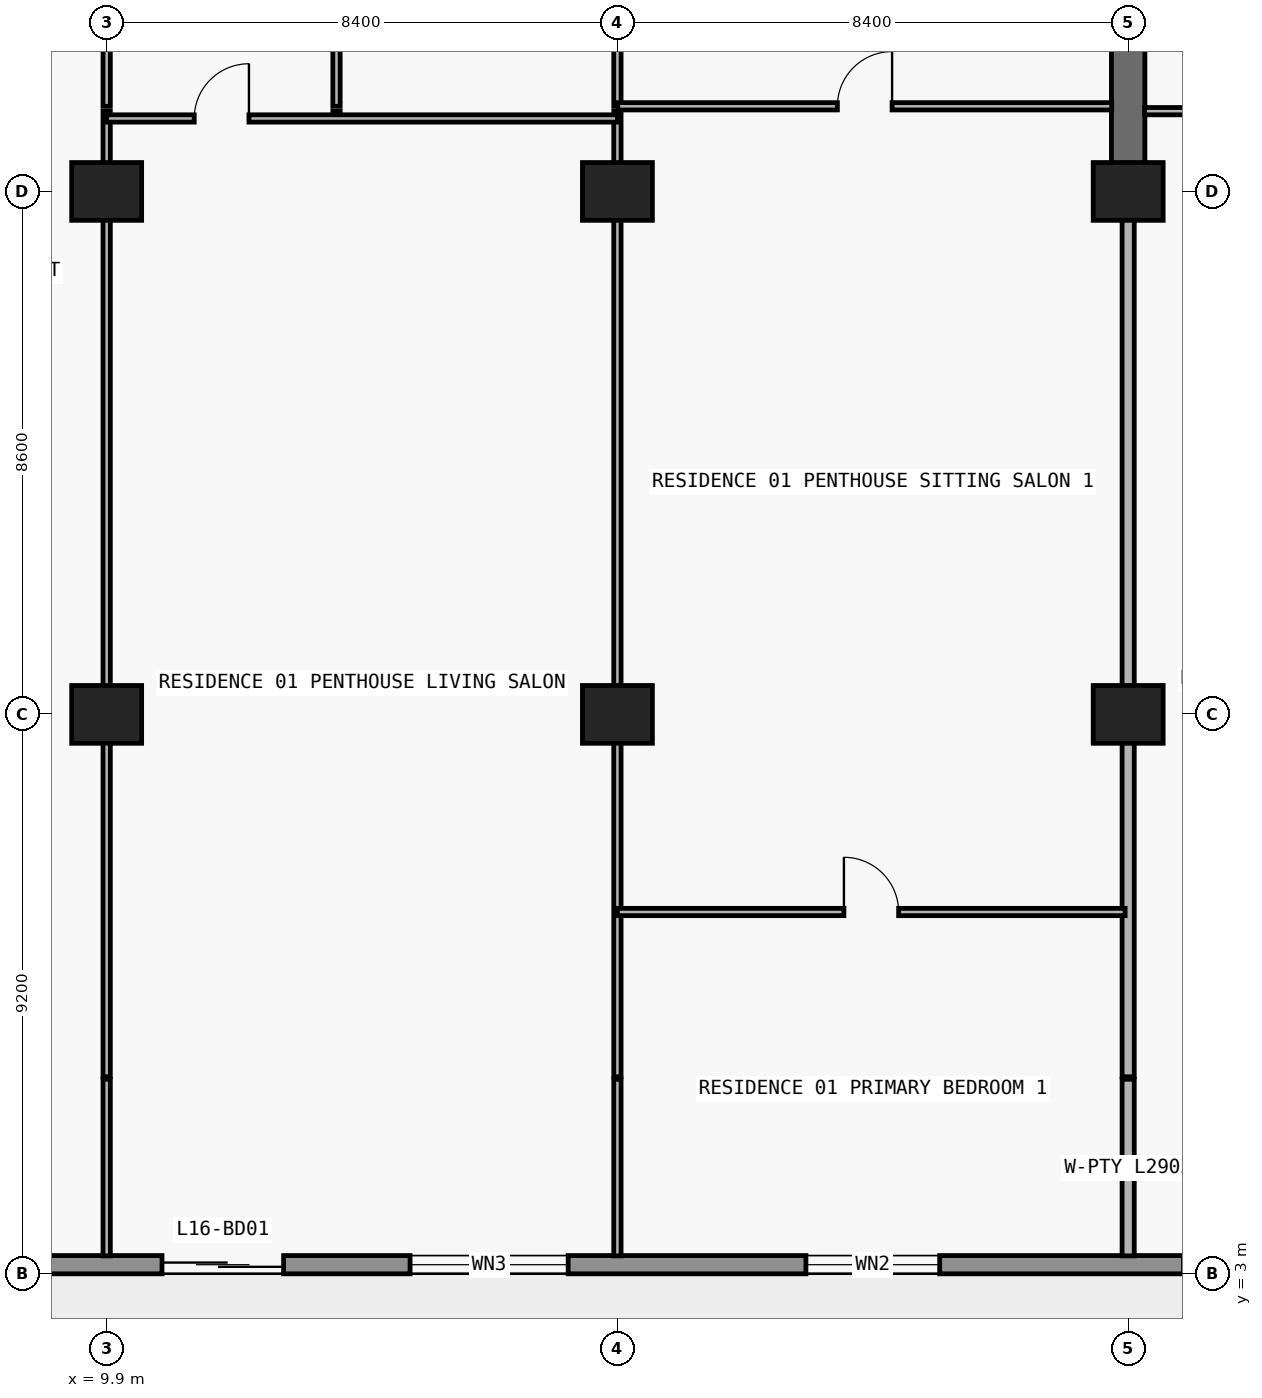
"""IFC4 building model, lengths in metres.
Left out: names, types, materials, properties, quantities, classifications, styles, units other than length and angle.
Written with IfcOpenShell. Run it as: python <this file> out.ifc"""

import sys

from ifc_helpers import new_model, si_unit, direction, frame, frame_2d, origin, origin_2d, place, context, subcontext, project, spatial, rectangle, extrude, element, fill, save


model = new_model("IFC4")
c1 = context("Model", 3, precision=1e-05, world=origin(), true_north=direction((0.0, 1.0)))
c2 = subcontext(c1, "Body", "Model", "MODEL_VIEW")
j1 = project(units=[si_unit("LENGTHUNIT", "METRE"), si_unit("PLANEANGLEUNIT", "RADIAN")], contexts=[c1])
p1 = place(None, origin())
s1 = spatial("IfcSite", under=j1, at=p1, CompositionType="ELEMENT")
p2 = place(p1, origin())
s2 = spatial("IfcBuilding", under=s1, at=p2, CompositionType="ELEMENT")
p3 = place(p2, frame((0.0, 0.0, 63.0)))
s3 = spatial("IfcBuildingStorey", under=s2, at=p3, CompositionType="ELEMENT", Elevation=63.0)
for number, where, z_axis, x_axis in (
    (1, (9.9, 12.2, 0.0), (0.0, 0.0, 1.0), (1.0, 0.0, 0.0)),
    (2, (18.3, 12.2, 0.0), (0.0, 0.0, 1.0), (1.0, 0.0, 0.0)),
    (3, (26.7, 12.2, 0.0), (0.0, 0.0, 1.0), (1.0, 0.0, 0.0)),
    (4, (9.9, 20.8, 0.0), (0.0, 0.0, 1.0), (1.0, 0.0, 0.0)),
    (5, (18.3, 20.8, 0.0), (0.0, 0.0, 1.0), (1.0, 0.0, 0.0)),
    (6, (26.7, 20.8, 0.0), (0.0, 0.0, 1.0), (1.0, 0.0, 0.0)),
):
    element("IfcColumn", number, at=place(p3, frame(where, z_axis=z_axis, x_axis=x_axis)), inside=s3, PredefinedType="COLUMN", context=c2, shape_type="SweptSolid", body=[
        extrude(rectangle(XDim=1.15, YDim=0.95, at=origin_2d()), origin(), (0.0, 0.0, 1.0), 3.05),
    ])
p4 = place(p3, frame((26.7, 20.8, 0.0), z_axis=(0.0, 0.0, 1.0), x_axis=(0.0, 1.0, 0.0)))
e7 = element("IfcWall", 7, at=p4, inside=s3, PredefinedType="SHEAR", context=c2, shape_type="SweptSolid", body=[
    extrude(rectangle(XDim=8.6, YDim=0.55, at=frame_2d((4.3, 0.0))), origin(), (0.0, 0.0, 1.0), 3.05),
])
p5 = place(p3, frame((72.7, 3.15, 0.0), z_axis=(0.0, 0.0, 1.0), x_axis=(-1.0, 0.0, 0.0)))
e8 = element("IfcWall", 8, at=p5, inside=s3, PredefinedType="STANDARD", context=c2, shape_type="SweptSolid", body=[
    extrude(rectangle(XDim=67.6, YDim=0.3, at=frame_2d((33.8, 0.0))), origin(), (0.0, 0.0, 1.0), 3.05),
])
p6 = place(p5, frame((59.89, 0.0, 0.0)))
e9 = element("IfcOpeningElement", 9, at=p6, cuts=e8, PredefinedType="OPENING", context=c2, shape_type="SweptSolid", body=[
    extrude(rectangle(XDim=2.0, YDim=2.3, at=frame_2d((1.0, 1.15))), frame((0.0, 0.16, 0.0), z_axis=(0.0, -1.0, 0.0), x_axis=(1.0, 0.0, 0.0)), (0.0, 0.0, 1.0), 0.32),
])
p7 = place(p5, frame((55.21, 0.0, 0.65)))
e10 = element("IfcOpeningElement", 10, at=p7, cuts=e8, PredefinedType="OPENING", context=c2, shape_type="SweptSolid", body=[
    extrude(rectangle(XDim=2.6, YDim=1.85, at=frame_2d((1.3, 0.925))), frame((0.0, 0.16, 0.0), z_axis=(0.0, -1.0, 0.0), x_axis=(1.0, 0.0, 0.0)), (0.0, 0.0, 1.0), 0.32),
])
p8 = place(p5, frame((49.1, 0.0, 0.85)))
e11 = element("IfcOpeningElement", 11, at=p8, cuts=e8, PredefinedType="OPENING", context=c2, shape_type="SweptSolid", body=[
    extrude(rectangle(XDim=2.2, YDim=1.55, at=frame_2d((1.1, 0.775))), frame((0.0, 0.16, 0.0), z_axis=(0.0, -1.0, 0.0), x_axis=(1.0, 0.0, 0.0)), (0.0, 0.0, 1.0), 0.32),
])
p9 = place(p5, frame((43.09, 0.0, 0.0)))
e12 = element("IfcOpeningElement", 12, at=p9, cuts=e8, PredefinedType="OPENING", context=c2, shape_type="SweptSolid", body=[
    extrude(rectangle(XDim=2.0, YDim=2.3, at=frame_2d((1.0, 1.15))), frame((0.0, 0.16, 0.0), z_axis=(0.0, -1.0, 0.0), x_axis=(1.0, 0.0, 0.0)), (0.0, 0.0, 1.0), 0.32),
])
p10 = place(p5, frame((38.41, 0.0, 0.65)))
e13 = element("IfcOpeningElement", 13, at=p10, cuts=e8, PredefinedType="OPENING", context=c2, shape_type="SweptSolid", body=[
    extrude(rectangle(XDim=2.6, YDim=1.85, at=frame_2d((1.3, 0.925))), frame((0.0, 0.16, 0.0), z_axis=(0.0, -1.0, 0.0), x_axis=(1.0, 0.0, 0.0)), (0.0, 0.0, 1.0), 0.32),
])
p11 = place(p5, frame((32.7, 0.0, 0.85)))
e14 = element("IfcOpeningElement", 14, at=p11, cuts=e8, PredefinedType="OPENING", context=c2, shape_type="SweptSolid", body=[
    extrude(rectangle(XDim=2.2, YDim=1.55, at=frame_2d((1.1, 0.775))), frame((0.0, 0.16, 0.0), z_axis=(0.0, -1.0, 0.0), x_axis=(1.0, 0.0, 0.0)), (0.0, 0.0, 1.0), 0.32),
])
p12 = place(p5, frame((27.026, 0.0, 0.0)))
e15 = element("IfcOpeningElement", 15, at=p12, cuts=e8, PredefinedType="OPENING", context=c2, shape_type="SweptSolid", body=[
    extrude(rectangle(XDim=2.0, YDim=2.3, at=frame_2d((1.0, 1.15))), frame((0.0, 0.16, 0.0), z_axis=(0.0, -1.0, 0.0), x_axis=(1.0, 0.0, 0.0)), (0.0, 0.0, 1.0), 0.32),
])
p13 = place(p5, frame((22.726, 0.0, 0.85)))
e16 = element("IfcOpeningElement", 16, at=p13, cuts=e8, PredefinedType="OPENING", context=c2, shape_type="SweptSolid", body=[
    extrude(rectangle(XDim=2.2, YDim=1.55, at=frame_2d((1.1, 0.775))), frame((0.0, 0.16, 0.0), z_axis=(0.0, -1.0, 0.0), x_axis=(1.0, 0.0, 0.0)), (0.0, 0.0, 1.0), 0.32),
])
p14 = place(p5, frame((18.29, 0.0, 0.0)))
e17 = element("IfcOpeningElement", 17, at=p14, cuts=e8, PredefinedType="OPENING", context=c2, shape_type="SweptSolid", body=[
    extrude(rectangle(XDim=2.0, YDim=2.3, at=frame_2d((1.0, 1.15))), frame((0.0, 0.16, 0.0), z_axis=(0.0, -1.0, 0.0), x_axis=(1.0, 0.0, 0.0)), (0.0, 0.0, 1.0), 0.32),
])
p15 = place(p5, frame((14.19, 0.0, 0.85)))
e18 = element("IfcOpeningElement", 18, at=p15, cuts=e8, PredefinedType="OPENING", context=c2, shape_type="SweptSolid", body=[
    extrude(rectangle(XDim=1.8, YDim=1.55, at=frame_2d((0.9, 0.775))), frame((0.0, 0.16, 0.0), z_axis=(0.0, -1.0, 0.0), x_axis=(1.0, 0.0, 0.0)), (0.0, 0.0, 1.0), 0.32),
])
p16 = place(p5, frame((10.226, 0.0, 0.0)))
e19 = element("IfcOpeningElement", 19, at=p16, cuts=e8, PredefinedType="OPENING", context=c2, shape_type="SweptSolid", body=[
    extrude(rectangle(XDim=2.0, YDim=2.3, at=frame_2d((1.0, 1.15))), frame((0.0, 0.16, 0.0), z_axis=(0.0, -1.0, 0.0), x_axis=(1.0, 0.0, 0.0)), (0.0, 0.0, 1.0), 0.32),
])
p17 = place(p5, frame((5.926, 0.0, 0.85)))
e20 = element("IfcOpeningElement", 20, at=p17, cuts=e8, PredefinedType="OPENING", context=c2, shape_type="SweptSolid", body=[
    extrude(rectangle(XDim=2.2, YDim=1.55, at=frame_2d((1.1, 0.775))), frame((0.0, 0.16, 0.0), z_axis=(0.0, -1.0, 0.0), x_axis=(1.0, 0.0, 0.0)), (0.0, 0.0, 1.0), 0.32),
])
p18 = place(p3, frame((9.9, 3.295, 0.0), z_axis=(0.0, 0.0, 1.0), x_axis=(0.0, 1.0, 0.0)))
e21 = element("IfcWall", 21, at=p18, inside=s3, PredefinedType="PARTITIONING", context=c2, shape_type="SweptSolid", body=[
    extrude(rectangle(XDim=2.905, YDim=0.12, at=frame_2d((1.453, 0.0))), origin(), (0.0, 0.0, 1.0), 3.05),
])
p19 = place(p3, frame((9.9, 6.24, 0.0), z_axis=(0.0, 0.0, 1.0), x_axis=(0.0, 1.0, 0.0)))
e22 = element("IfcWall", 22, at=p19, inside=s3, PredefinedType="PARTITIONING", context=c2, shape_type="SweptSolid", body=[
    extrude(rectangle(XDim=15.88, YDim=0.12, at=frame_2d((7.94, 0.0))), origin(), (0.0, 0.0, 1.0), 2.11),
])
p20 = place(p3, frame((9.9, 22.2, 0.0), z_axis=(0.0, 0.0, 1.0), x_axis=(0.0, 1.0, 0.0)))
e23 = element("IfcWall", 23, at=p20, inside=s3, PredefinedType="PARTITIONING", context=c2, shape_type="SweptSolid", body=[
    extrude(rectangle(XDim=4.38, YDim=0.12, at=frame_2d((2.19, 0.0))), origin(), (0.0, 0.0, 1.0), 2.11),
])
p21 = place(p20, frame((1.74, 0.0, 0.0)))
e24 = element("IfcOpeningElement", 24, at=p21, cuts=e23, PredefinedType="OPENING", context=c2, shape_type="SweptSolid", body=[
    extrude(rectangle(XDim=0.9, YDim=2.06, at=frame_2d((0.45, 1.03))), frame((0.0, 0.07, 0.0), z_axis=(0.0, -1.0, 0.0), x_axis=(1.0, 0.0, 0.0)), (0.0, 0.0, 1.0), 0.14),
])
p22 = place(p3, frame((13.68, 22.0, 0.0), z_axis=(0.0, 0.0, 1.0), x_axis=(0.0, 1.0, 0.0)))
e25 = element("IfcWall", 25, at=p22, inside=s3, PredefinedType="PARTITIONING", context=c2, shape_type="SweptSolid", body=[
    extrude(rectangle(XDim=0.12, YDim=0.12, at=frame_2d((0.06, 0.0))), origin(), (0.0, 0.0, 1.0), 3.05),
])
p23 = place(p3, frame((13.68, 22.2, 0.0), z_axis=(0.0, 0.0, 1.0), x_axis=(0.0, 1.0, 0.0)))
e26 = element("IfcWall", 26, at=p23, inside=s3, PredefinedType="PARTITIONING", context=c2, shape_type="SweptSolid", body=[
    extrude(rectangle(XDim=4.38, YDim=0.12, at=frame_2d((2.19, 0.0))), origin(), (0.0, 0.0, 1.0), 3.05),
])
p24 = place(p23, frame((1.74, 0.0, 0.0)))
e27 = element("IfcOpeningElement", 27, at=p24, cuts=e26, PredefinedType="OPENING", context=c2, shape_type="SweptSolid", body=[
    extrude(rectangle(XDim=0.9, YDim=2.15, at=frame_2d((0.45, 1.075))), frame((0.0, 0.07, 0.0), z_axis=(0.0, -1.0, 0.0), x_axis=(1.0, 0.0, 0.0)), (0.0, 0.0, 1.0), 0.14),
])
p25 = place(p3, frame((18.3, 3.295, 0.0), z_axis=(0.0, 0.0, 1.0), x_axis=(0.0, 1.0, 0.0)))
e28 = element("IfcWall", 28, at=p25, inside=s3, PredefinedType="PARTITIONING", context=c2, shape_type="SweptSolid", body=[
    extrude(rectangle(XDim=2.905, YDim=0.12, at=frame_2d((1.453, 0.0))), origin(), (0.0, 0.0, 1.0), 3.05),
])
p26 = place(p3, frame((18.3, 6.24, 0.0), z_axis=(0.0, 0.0, 1.0), x_axis=(0.0, 1.0, 0.0)))
e29 = element("IfcWall", 29, at=p26, inside=s3, PredefinedType="PARTITIONING", context=c2, shape_type="SweptSolid", body=[
    extrude(rectangle(XDim=15.88, YDim=0.12, at=frame_2d((7.94, 0.0))), origin(), (0.0, 0.0, 1.0), 2.11),
])
p27 = place(p3, frame((18.3, 22.2, 0.0), z_axis=(0.0, 0.0, 1.0), x_axis=(0.0, 1.0, 0.0)))
e30 = element("IfcWall", 30, at=p27, inside=s3, PredefinedType="PARTITIONING", context=c2, shape_type="SweptSolid", body=[
    extrude(rectangle(XDim=4.38, YDim=0.12, at=frame_2d((2.19, 0.0))), origin(), (0.0, 0.0, 1.0), 2.11),
])
p28 = place(p27, frame((1.74, 0.0, 0.0)))
e31 = element("IfcOpeningElement", 31, at=p28, cuts=e30, PredefinedType="OPENING", context=c2, shape_type="SweptSolid", body=[
    extrude(rectangle(XDim=0.9, YDim=2.06, at=frame_2d((0.45, 1.03))), frame((0.0, 0.07, 0.0), z_axis=(0.0, -1.0, 0.0), x_axis=(1.0, 0.0, 0.0)), (0.0, 0.0, 1.0), 0.14),
])
p29 = place(p3, frame((26.7, 3.295, 0.0), z_axis=(0.0, 0.0, 1.0), x_axis=(0.0, 1.0, 0.0)))
e32 = element("IfcWall", 32, at=p29, inside=s3, PredefinedType="PARTITIONING", context=c2, shape_type="SweptSolid", body=[
    extrude(rectangle(XDim=2.905, YDim=0.2, at=frame_2d((1.453, 0.0))), origin(), (0.0, 0.0, 1.0), 3.05),
])
p30 = place(p3, frame((26.7, 6.24, 0.0), z_axis=(0.0, 0.0, 1.0), x_axis=(0.0, 1.0, 0.0)))
e33 = element("IfcWall", 33, at=p30, inside=s3, PredefinedType="PARTITIONING", context=c2, shape_type="SweptSolid", body=[
    extrude(rectangle(XDim=14.555, YDim=0.2, at=frame_2d((7.277, 0.0))), origin(), (0.0, 0.0, 1.0), 2.11),
])
p31 = place(p3, frame((18.3, 8.95, 0.0), z_axis=(0.0, 0.0, 1.0), x_axis=(1.0, 0.0, 0.0)))
e34 = element("IfcWall", 34, at=p31, inside=s3, PredefinedType="PARTITIONING", context=c2, shape_type="SweptSolid", body=[
    extrude(rectangle(XDim=8.35, YDim=0.12, at=frame_2d((4.175, 0.0))), origin(), (0.0, 0.0, 1.0), 3.05),
])
p32 = place(p31, frame((3.725, 0.0, 0.0)))
e35 = element("IfcOpeningElement", 35, at=p32, cuts=e34, PredefinedType="OPENING", context=c2, shape_type="SweptSolid", body=[
    extrude(rectangle(XDim=0.9, YDim=2.15, at=frame_2d((0.45, 1.075))), frame((0.0, 0.07, 0.0), z_axis=(0.0, -1.0, 0.0), x_axis=(1.0, 0.0, 0.0)), (0.0, 0.0, 1.0), 0.14),
])
p33 = place(p3, frame((9.9, 22.0, 0.0), z_axis=(0.0, 0.0, 1.0), x_axis=(1.0, 0.0, 0.0)))
e36 = element("IfcWall", 36, at=p33, inside=s3, PredefinedType="PARTITIONING", context=c2, shape_type="SweptSolid", body=[
    extrude(rectangle(XDim=8.4, YDim=0.12, at=frame_2d((4.2, 0.0))), origin(), (0.0, 0.0, 1.0), 3.05),
])
p34 = place(p33, frame((1.44, 0.0, 0.0)))
e37 = element("IfcOpeningElement", 37, at=p34, cuts=e36, PredefinedType="OPENING", context=c2, shape_type="SweptSolid", body=[
    extrude(rectangle(XDim=0.9, YDim=2.15, at=frame_2d((0.45, 1.075))), frame((0.0, 0.07, 0.0), z_axis=(0.0, -1.0, 0.0), x_axis=(1.0, 0.0, 0.0)), (0.0, 0.0, 1.0), 0.14),
])
p35 = place(p3, frame((26.97, 22.12, 0.0), z_axis=(0.0, 0.0, 1.0), x_axis=(1.0, 0.0, 0.0)))
e38 = element("IfcWall", 38, at=p35, inside=s3, PredefinedType="PARTITIONING", context=c2, shape_type="SweptSolid", body=[
    extrude(rectangle(XDim=8.13, YDim=0.12, at=frame_2d((4.065, 0.0))), origin(), (0.0, 0.0, 1.0), 3.05),
])
p36 = place(p35, frame((1.179, 0.0, 0.0)))
e39 = element("IfcOpeningElement", 39, at=p36, cuts=e38, PredefinedType="OPENING", context=c2, shape_type="SweptSolid", body=[
    extrude(rectangle(XDim=0.9, YDim=2.15, at=frame_2d((0.45, 1.075))), frame((0.0, 0.07, 0.0), z_axis=(0.0, -1.0, 0.0), x_axis=(1.0, 0.0, 0.0)), (0.0, 0.0, 1.0), 0.14),
])
p37 = place(p3, frame((18.305, 22.2, 0.0), z_axis=(0.0, 0.0, 1.0), x_axis=(1.0, 0.0, 0.0)))
e40 = element("IfcWall", 40, at=p37, inside=s3, PredefinedType="PARTITIONING", context=c2, shape_type="SweptSolid", body=[
    extrude(rectangle(XDim=8.125, YDim=0.12, at=frame_2d((4.062, 0.0))), origin(), (0.0, 0.0, 1.0), 3.05),
])
p38 = place(p37, frame((3.613, 0.0, 0.0)))
e41 = element("IfcOpeningElement", 41, at=p38, cuts=e40, PredefinedType="OPENING", context=c2, shape_type="SweptSolid", body=[
    extrude(rectangle(XDim=0.9, YDim=2.15, at=frame_2d((0.45, 1.075))), frame((0.0, 0.07, 0.0), z_axis=(0.0, -1.0, 0.0), x_axis=(1.0, 0.0, 0.0)), (0.0, 0.0, 1.0), 0.14),
])
p39 = place(p6, origin())
e42 = element("IfcDoor", 42, at=p39, inside=s3, OperationType="DOUBLE_DOOR_SLIDING", PredefinedType="DOOR", context=c2, shape_type="SweptSolid", body=[
    extrude(rectangle(XDim=2.0, YDim=2.3, at=frame_2d((1.0, 1.15))), frame((0.0, 0.025, 0.0), z_axis=(0.0, -1.0, 0.0), x_axis=(1.0, 0.0, 0.0)), (0.0, 0.0, 1.0), 0.05),
])
fill(e9, e42)
p40 = place(p7, origin())
e43 = element("IfcWindow", 43, at=p40, inside=s3, PartitioningType="SINGLE_PANEL", PredefinedType="WINDOW", context=c2, shape_type="SweptSolid", body=[
    extrude(rectangle(XDim=2.6, YDim=1.85, at=frame_2d((1.3, 0.925))), frame((0.0, 0.03, 0.0), z_axis=(0.0, -1.0, 0.0), x_axis=(1.0, 0.0, 0.0)), (0.0, 0.0, 1.0), 0.06),
])
fill(e10, e43)
p41 = place(p8, origin())
e44 = element("IfcWindow", 44, at=p41, inside=s3, PartitioningType="SINGLE_PANEL", PredefinedType="WINDOW", context=c2, shape_type="SweptSolid", body=[
    extrude(rectangle(XDim=2.2, YDim=1.55, at=frame_2d((1.1, 0.775))), frame((0.0, 0.03, 0.0), z_axis=(0.0, -1.0, 0.0), x_axis=(1.0, 0.0, 0.0)), (0.0, 0.0, 1.0), 0.06),
])
fill(e11, e44)
p42 = place(p34, origin())
e45 = element("IfcDoor", 45, at=p42, inside=s3, OperationType="SINGLE_SWING_RIGHT", PredefinedType="DOOR", context=c2, shape_type="SweptSolid", body=[
    extrude(rectangle(XDim=0.9, YDim=2.15, at=frame_2d((0.45, 1.075))), frame((0.0, 0.025, 0.0), z_axis=(0.0, -1.0, 0.0), x_axis=(1.0, 0.0, 0.0)), (0.0, 0.0, 1.0), 0.05),
])
fill(e37, e45)
p43 = place(p38, origin())
e46 = element("IfcDoor", 46, at=p43, inside=s3, OperationType="SINGLE_SWING_RIGHT", PredefinedType="DOOR", context=c2, shape_type="SweptSolid", body=[
    extrude(rectangle(XDim=0.9, YDim=2.15, at=frame_2d((0.45, 1.075))), frame((0.0, 0.025, 0.0), z_axis=(0.0, -1.0, 0.0), x_axis=(1.0, 0.0, 0.0)), (0.0, 0.0, 1.0), 0.05),
])
fill(e41, e46)
p44 = place(p32, origin())
e47 = element("IfcDoor", 47, at=p44, inside=s3, OperationType="SINGLE_SWING_LEFT", PredefinedType="DOOR", context=c2, shape_type="SweptSolid", body=[
    extrude(rectangle(XDim=0.9, YDim=2.15, at=frame_2d((0.45, 1.075))), frame((0.0, 0.025, 0.0), z_axis=(0.0, -1.0, 0.0), x_axis=(1.0, 0.0, 0.0)), (0.0, 0.0, 1.0), 0.05),
])
fill(e35, e47)
save(model, sys.argv[1])
